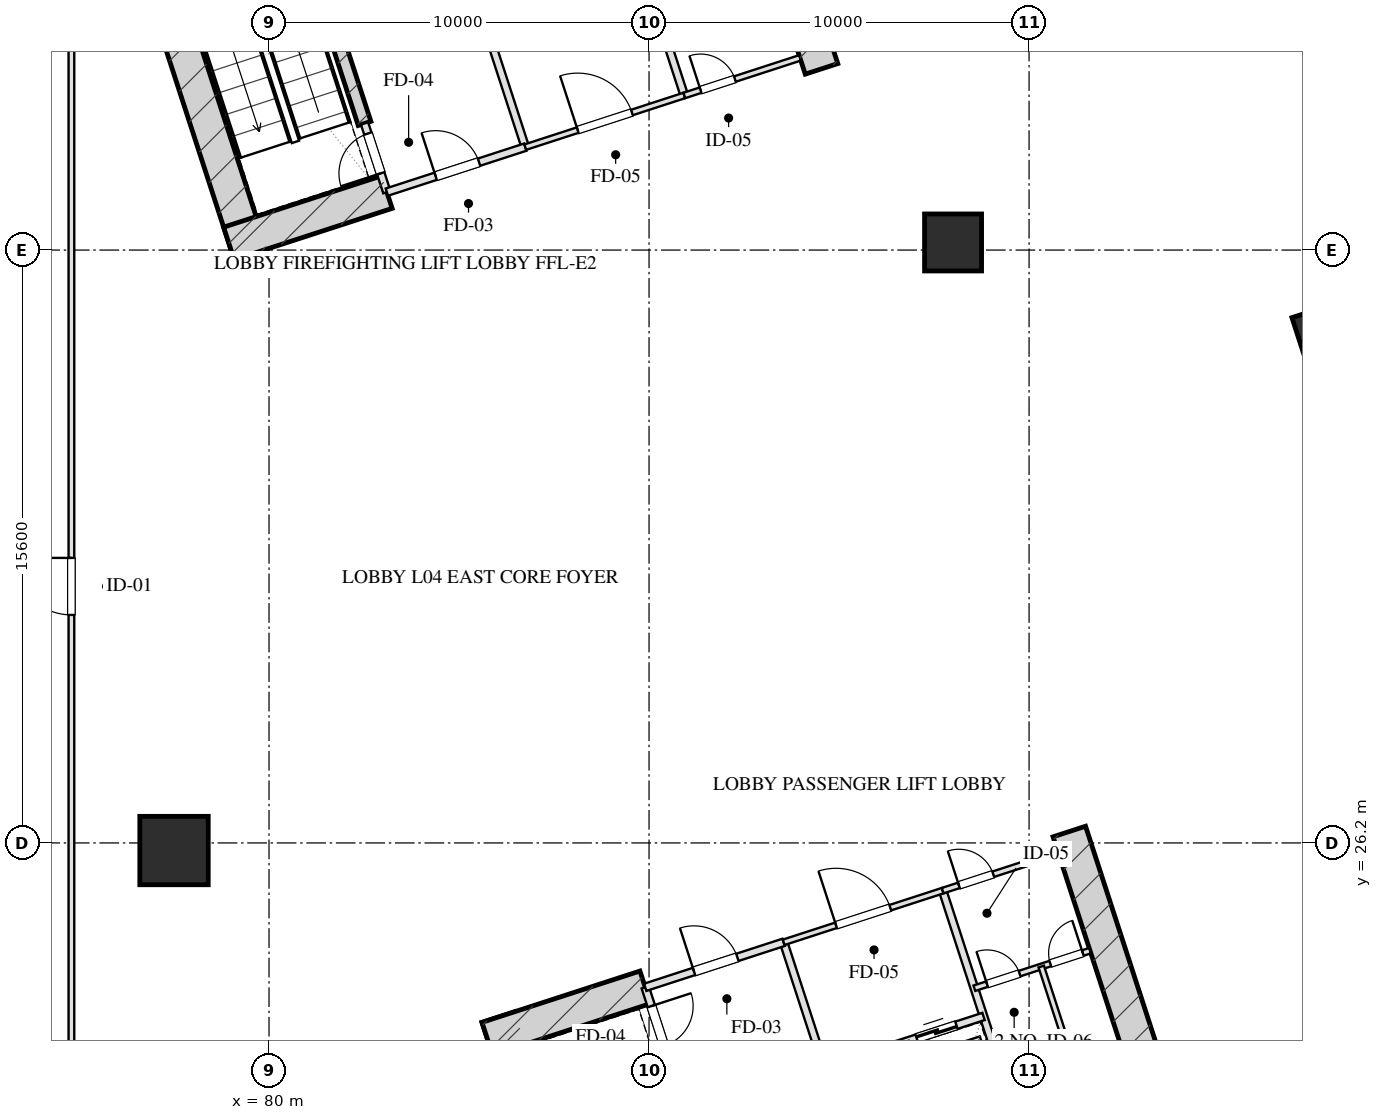
"""IFC4 building model, lengths in metres.
Left out: names, types, materials, properties, quantities, classifications, styles, units other than length and angle.
Written with IfcOpenShell. Run it as: python <this file> out.ifc"""

import sys

from ifc_helpers import new_model, si_unit, direction, frame, frame_2d, origin, origin_2d, place, context, subcontext, project, spatial, rectangle, hollow_rectangle, extrude, element, fill, save


model = new_model("IFC4")
c1 = context("Model", 3, precision=1e-05, world=origin(), true_north=direction((0.0, 1.0)))
c2 = subcontext(c1, "Body", "Model", "MODEL_VIEW")
j1 = project(units=[si_unit("LENGTHUNIT", "METRE"), si_unit("PLANEANGLEUNIT", "RADIAN")], contexts=[c1])
p1 = place(None, origin())
s1 = spatial("IfcSite", under=j1, at=p1, CompositionType="ELEMENT")
p2 = place(p1, origin())
s2 = spatial("IfcBuilding", under=s1, at=p2, CompositionType="ELEMENT")
p3 = place(p2, frame((0.0, 0.0, 22.0)))
s3 = spatial("IfcBuildingStorey", under=s2, at=p3, CompositionType="ELEMENT", Elevation=22.0)
p4 = place(p3, frame((86.032, 21.618, 0.0), z_axis=(0.0, 0.0, 1.0), x_axis=(0.30901438634, -0.951057363693, 0.0)))
e1 = element("IfcWall", 1, at=p4, inside=s3, PredefinedType="SHEAR", context=c2, shape_type="SweptSolid", body=[
    extrude(rectangle(XDim=9.78, YDim=0.9, at=frame_2d((4.89, 0.0))), origin(), (0.0, 0.0, 1.0), 4.0),
])
p5 = place(p3, frame((101.059, 26.5, 0.0), z_axis=(0.0, 0.0, 1.0), x_axis=(0.309021722829, -0.951054979914, 0.0)))
e2 = element("IfcWall", 2, at=p5, inside=s3, PredefinedType="SHEAR", context=c2, shape_type="SweptSolid", body=[
    extrude(rectangle(XDim=9.78, YDim=0.9, at=frame_2d((4.89, 0.0))), origin(), (0.0, 0.0, 1.0), 4.0),
])
p6 = place(p3, frame((85.743, 21.051, 0.0), z_axis=(0.0, 0.0, 1.0), x_axis=(0.951063623806, 0.308995118848, 0.0)))
e3 = element("IfcWall", 3, at=p6, inside=s3, PredefinedType="SHEAR", context=c2, shape_type="SweptSolid", body=[
    extrude(rectangle(XDim=4.37, YDim=0.9, at=frame_2d((2.185, 0.0))), origin(), (0.0, 0.0, 1.0), 4.0),
])
for number, where, z_axis, x_axis in (
    (4, (79.512, 41.685, 0.0), (0.0, 0.0, 1.0), (-0.309, 0.951, 0.0)),
    (5, (94.539, 46.568, 0.0), (0.0, 0.0, 1.0), (-0.309, 0.951, 0.0)),
):
    element("IfcWall", number, at=place(p3, frame(where, z_axis=z_axis, x_axis=x_axis)), inside=s3, PredefinedType="SHEAR", context=c2, shape_type="SweptSolid", body=[
        extrude(rectangle(XDim=9.78, YDim=0.9, at=frame_2d((4.89, 0.0))), origin(), (0.0, 0.0, 1.0), 4.0),
    ])
p7 = place(p3, frame((82.514, 45.131, 0.0), z_axis=(0.0, 0.0, 1.0), x_axis=(-0.308988790936, 0.951065679686, 0.0)))
e6 = element("IfcWall", 6, at=p7, inside=s3, PredefinedType="SHEAR", context=c2, shape_type="SweptSolid", body=[
    extrude(rectangle(XDim=6.98, YDim=0.35, at=frame_2d((3.49, 0.0))), origin(), (0.0, 0.0, 1.0), 4.0),
])
p8 = place(p3, frame((78.945, 41.974, 0.0), z_axis=(0.0, 0.0, 1.0), x_axis=(0.951058289404, 0.309011537255, 0.0)))
e7 = element("IfcWall", 7, at=p8, inside=s3, PredefinedType="SHEAR", context=c2, shape_type="SweptSolid", body=[
    extrude(rectangle(XDim=4.37, YDim=0.9, at=frame_2d((2.185, 0.0))), origin(), (0.0, 0.0, 1.0), 4.0),
])
p9 = place(p3, frame((77.5, 26.0, 0.0), z_axis=(0.0, 0.0, 1.0), x_axis=(1.0, 0.0, 0.0)))
e8 = element("IfcColumn", 8, at=p9, inside=s3, PredefinedType="COLUMN", context=c2, shape_type="SweptSolid", body=[
    extrude(hollow_rectangle(XDim=1.8, YDim=1.8, WallThickness=0.06, at=origin_2d()), origin(), (0.0, 0.0, 1.0), 4.001),
])
p10 = place(p3, frame((98.0, 42.0, 0.0), z_axis=(0.0, 0.0, 1.0), x_axis=(1.0, 0.0, 0.0)))
e9 = element("IfcColumn", 9, at=p10, inside=s3, PredefinedType="COLUMN", context=c2, shape_type="SweptSolid", body=[
    extrude(rectangle(XDim=1.5, YDim=1.5, at=origin_2d()), origin(), (0.0, 0.0, 1.0), 4.001),
])
p11 = place(p3, frame((107.547, 39.701, 0.0), z_axis=(0.0, 0.0, 1.0), x_axis=(0.951056516295, 0.309016994375, 0.0)))
e10 = element("IfcColumn", 10, at=p11, inside=s3, PredefinedType="COLUMN", context=c2, shape_type="SweptSolid", body=[
    extrude(hollow_rectangle(XDim=1.0, YDim=1.0, WallThickness=0.036, at=origin_2d()), origin(), (0.0, 0.0, 1.0), 4.001),
])
p12 = place(p3, frame((89.899, 22.401, 0.0), z_axis=(0.0, 0.0, 1.0), x_axis=(0.308932062672, -0.951084108086, 0.0)))
e11 = element("IfcWall", 11, at=p12, inside=s3, PredefinedType="PARTITIONING", context=c2, shape_type="SweptSolid", body=[
    extrude(rectangle(XDim=1.9, YDim=0.2, at=frame_2d((0.95, 0.0))), origin(), (0.0, 0.0, 1.0), 3.725),
])
p13 = place(p12, frame((0.52, 0.0, 0.0)))
e12 = element("IfcOpeningElement", 12, at=p13, cuts=e11, PredefinedType="OPENING", context=c2, shape_type="SweptSolid", body=[
    extrude(rectangle(XDim=1.1, YDim=2.05, at=frame_2d((0.55, 1.025))), frame((0.0, 0.11, 0.0), z_axis=(0.0, -1.0, 0.0), x_axis=(1.0, 0.0, 0.0)), (0.0, 0.0, 1.0), 0.22),
])
p14 = place(p3, frame((93.542, 23.585, 0.0), z_axis=(0.0, 0.0, 1.0), x_axis=(0.309042196757, -0.951048327176, 0.0)))
e13 = element("IfcWall", 13, at=p14, inside=s3, PredefinedType="PARTITIONING", context=c2, shape_type="SweptSolid", body=[
    extrude(rectangle(XDim=8.43, YDim=0.2, at=frame_2d((4.215, 0.0))), origin(), (0.0, 0.0, 1.0), 3.725),
])
p15 = place(p3, frame((89.899, 22.401, 0.0), z_axis=(0.0, 0.0, 1.0), x_axis=(0.951046716504, 0.309047153403, 0.0)))
e14 = element("IfcWall", 14, at=p15, inside=s3, PredefinedType="PARTITIONING", context=c2, shape_type="SweptSolid", body=[
    extrude(rectangle(XDim=3.83, YDim=0.2, at=frame_2d((1.915, 0.0))), origin(), (0.0, 0.0, 1.0), 3.725),
])
p16 = place(p15, frame((1.35, 0.0, 0.0)))
e15 = element("IfcOpeningElement", 15, at=p16, cuts=e14, PredefinedType="OPENING", context=c2, shape_type="SweptSolid", body=[
    extrude(rectangle(XDim=1.2, YDim=2.05, at=frame_2d((0.6, 1.025))), frame((0.0, 0.11, 0.0), z_axis=(0.0, -1.0, 0.0), x_axis=(1.0, 0.0, 0.0)), (0.0, 0.0, 1.0), 0.22),
])
p17 = place(p3, frame((97.727, 24.944, 0.0), z_axis=(0.0, 0.0, 1.0), x_axis=(0.309016001439, -0.951056838919, 0.0)))
e16 = element("IfcWall", 16, at=p17, inside=s3, PredefinedType="PARTITIONING", context=c2, shape_type="SweptSolid", body=[
    extrude(rectangle(XDim=8.43, YDim=0.2, at=frame_2d((4.215, 0.0))), origin(), (0.0, 0.0, 1.0), 3.725),
])
p18 = place(p3, frame((93.542, 23.585, 0.0), z_axis=(0.0, 0.0, 1.0), x_axis=(0.951063829732, 0.308994485023, 0.0)))
e17 = element("IfcWall", 17, at=p18, inside=s3, PredefinedType="PARTITIONING", context=c2, shape_type="SweptSolid", body=[
    extrude(rectangle(XDim=4.4, YDim=0.15, at=frame_2d((2.2, 0.0))), origin(), (0.0, 0.0, 1.0), 3.725),
])
p19 = place(p18, frame((1.45, 0.0, 0.0)))
e18 = element("IfcOpeningElement", 18, at=p19, cuts=e17, PredefinedType="OPENING", context=c2, shape_type="SweptSolid", body=[
    extrude(rectangle(XDim=1.5, YDim=2.05, at=frame_2d((0.75, 1.025))), frame((0.0, 0.085, 0.0), z_axis=(0.0, -1.0, 0.0), x_axis=(1.0, 0.0, 0.0)), (0.0, 0.0, 1.0), 0.17),
])
p20 = place(p3, frame((94.617, 20.275, 0.0), z_axis=(0.0, 0.0, 1.0), x_axis=(0.951058531764, 0.30901079133, 0.0)))
e19 = element("IfcWall", 19, at=p20, inside=s3, PredefinedType="PARTITIONING", context=c2, shape_type="SweptSolid", body=[
    extrude(rectangle(XDim=4.4, YDim=0.2, at=frame_2d((2.2, 0.0))), origin(), (0.0, 0.0, 1.0), 3.725),
])
p21 = place(p20, frame((0.45, 0.0, 0.0)))
e20 = element("IfcOpeningElement", 20, at=p21, cuts=e19, PredefinedType="OPENING", context=c2, shape_type="SweptSolid", body=[
    extrude(rectangle(XDim=1.1, YDim=2.05, at=frame_2d((0.55, 1.025))), frame((0.0, 0.11, 0.0), z_axis=(0.0, -1.0, 0.0), x_axis=(1.0, 0.0, 0.0)), (0.0, 0.0, 1.0), 0.22),
])
p22 = place(p20, frame((2.55, 0.0, 0.0)))
e21 = element("IfcOpeningElement", 21, at=p22, cuts=e19, PredefinedType="OPENING", context=c2, shape_type="SweptSolid", body=[
    extrude(rectangle(XDim=1.1, YDim=2.05, at=frame_2d((0.55, 1.025))), frame((0.0, 0.11, 0.0), z_axis=(0.0, -1.0, 0.0), x_axis=(1.0, 0.0, 0.0)), (0.0, 0.0, 1.0), 0.22),
])
p23 = place(p3, frame((97.727, 24.944, 0.0), z_axis=(0.0, 0.0, 1.0), x_axis=(0.951036872128, 0.309077446369, 0.0)))
e22 = element("IfcWall", 22, at=p23, inside=s3, PredefinedType="PARTITIONING", context=c2, shape_type="SweptSolid", body=[
    extrude(rectangle(XDim=3.2, YDim=0.15, at=frame_2d((1.6, 0.0))), origin(), (0.0, 0.0, 1.0), 3.725),
])
p24 = place(p23, frame((0.45, 0.0, 0.0)))
e23 = element("IfcOpeningElement", 23, at=p24, cuts=e22, PredefinedType="OPENING", context=c2, shape_type="SweptSolid", body=[
    extrude(rectangle(XDim=0.95, YDim=2.05, at=frame_2d((0.475, 1.025))), frame((0.0, 0.085, 0.0), z_axis=(0.0, -1.0, 0.0), x_axis=(1.0, 0.0, 0.0)), (0.0, 0.0, 1.0), 0.17),
])
p25 = place(p3, frame((98.561, 22.376, 0.0), z_axis=(0.0, 0.0, 1.0), x_axis=(0.95104415986, 0.309055020985, 0.0)))
e24 = element("IfcWall", 24, at=p25, inside=s3, PredefinedType="PARTITIONING", context=c2, shape_type="SweptSolid", body=[
    extrude(rectangle(XDim=3.2, YDim=0.15, at=frame_2d((1.6, 0.0))), origin(), (0.0, 0.0, 1.0), 3.725),
])
p26 = place(p25, frame((0.35, 0.0, 0.0)))
e25 = element("IfcOpeningElement", 25, at=p26, cuts=e24, PredefinedType="OPENING", context=c2, shape_type="SweptSolid", body=[
    extrude(rectangle(XDim=0.9, YDim=2.05, at=frame_2d((0.45, 1.025))), frame((0.0, 0.085, 0.0), z_axis=(0.0, -1.0, 0.0), x_axis=(1.0, 0.0, 0.0)), (0.0, 0.0, 1.0), 0.17),
])
p27 = place(p25, frame((2.1, 0.0, 0.0)))
e26 = element("IfcOpeningElement", 26, at=p27, cuts=e24, PredefinedType="OPENING", context=c2, shape_type="SweptSolid", body=[
    extrude(rectangle(XDim=0.9, YDim=2.05, at=frame_2d((0.45, 1.025))), frame((0.0, 0.085, 0.0), z_axis=(0.0, -1.0, 0.0), x_axis=(1.0, 0.0, 0.0)), (0.0, 0.0, 1.0), 0.17),
])
p28 = place(p3, frame((100.32, 22.948, 0.0), z_axis=(0.0, 0.0, 1.0), x_axis=(0.309035009867, -0.951050662518, 0.0)))
e27 = element("IfcWall", 27, at=p28, inside=s3, PredefinedType="PARTITIONING", context=c2, shape_type="SweptSolid", body=[
    extrude(rectangle(XDim=5.73, YDim=0.15, at=frame_2d((2.865, 0.0))), origin(), (0.0, 0.0, 1.0), 3.725),
])
p29 = place(p3, frame((83.101, 43.324, 0.0), z_axis=(0.0, 0.0, 1.0), x_axis=(-0.309048298632, 0.951046344356, 0.0)))
e28 = element("IfcWall", 28, at=p29, inside=s3, PredefinedType="PARTITIONING", context=c2, shape_type="SweptSolid", body=[
    extrude(rectangle(XDim=1.9, YDim=0.2, at=frame_2d((0.95, 0.0))), origin(), (0.0, 0.0, 1.0), 3.725),
])
p30 = place(p29, frame((0.52, 0.0, 0.0)))
e29 = element("IfcOpeningElement", 29, at=p30, cuts=e28, PredefinedType="OPENING", context=c2, shape_type="SweptSolid", body=[
    extrude(rectangle(XDim=1.1, YDim=2.05, at=frame_2d((0.55, 1.025))), frame((0.0, 0.11, 0.0), z_axis=(0.0, -1.0, 0.0), x_axis=(1.0, 0.0, 0.0)), (0.0, 0.0, 1.0), 0.22),
])
p31 = place(p3, frame((86.743, 44.508, 0.0), z_axis=(0.0, 0.0, 1.0), x_axis=(-0.309016001439, 0.951056838919, 0.0)))
e30 = element("IfcWall", 30, at=p31, inside=s3, PredefinedType="PARTITIONING", context=c2, shape_type="SweptSolid", body=[
    extrude(rectangle(XDim=8.43, YDim=0.2, at=frame_2d((4.215, 0.0))), origin(), (0.0, 0.0, 1.0), 3.725),
])
p32 = place(p3, frame((83.101, 43.324, 0.0), z_axis=(0.0, 0.0, 1.0), x_axis=(0.951052804469, 0.309028417967, 0.0)))
e31 = element("IfcWall", 31, at=p32, inside=s3, PredefinedType="PARTITIONING", context=c2, shape_type="SweptSolid", body=[
    extrude(rectangle(XDim=3.83, YDim=0.2, at=frame_2d((1.915, 0.0))), origin(), (0.0, 0.0, 1.0), 3.725),
])
p33 = place(p32, frame((1.35, 0.0, 0.0)))
e32 = element("IfcOpeningElement", 32, at=p33, cuts=e31, PredefinedType="OPENING", context=c2, shape_type="SweptSolid", body=[
    extrude(rectangle(XDim=1.2, YDim=2.05, at=frame_2d((0.6, 1.025))), frame((0.0, 0.11, 0.0), z_axis=(0.0, -1.0, 0.0), x_axis=(1.0, 0.0, 0.0)), (0.0, 0.0, 1.0), 0.22),
])
p34 = place(p3, frame((90.928, 45.868, 0.0), z_axis=(0.0, 0.0, 1.0), x_axis=(-0.309042196757, 0.951048327176, 0.0)))
e33 = element("IfcWall", 33, at=p34, inside=s3, PredefinedType="PARTITIONING", context=c2, shape_type="SweptSolid", body=[
    extrude(rectangle(XDim=8.43, YDim=0.2, at=frame_2d((4.215, 0.0))), origin(), (0.0, 0.0, 1.0), 3.725),
])
p35 = place(p3, frame((86.743, 44.508, 0.0), z_axis=(0.0, 0.0, 1.0), x_axis=(0.951063829732, 0.308994485023, 0.0)))
e34 = element("IfcWall", 34, at=p35, inside=s3, PredefinedType="PARTITIONING", context=c2, shape_type="SweptSolid", body=[
    extrude(rectangle(XDim=4.4, YDim=0.15, at=frame_2d((2.2, 0.0))), origin(), (0.0, 0.0, 1.0), 3.725),
])
p36 = place(p35, frame((1.45, 0.0, 0.0)))
e35 = element("IfcOpeningElement", 35, at=p36, cuts=e34, PredefinedType="OPENING", context=c2, shape_type="SweptSolid", body=[
    extrude(rectangle(XDim=1.5, YDim=2.05, at=frame_2d((0.75, 1.025))), frame((0.0, 0.085, 0.0), z_axis=(0.0, -1.0, 0.0), x_axis=(1.0, 0.0, 0.0)), (0.0, 0.0, 1.0), 0.17),
])
p37 = place(p3, frame((90.928, 45.868, 0.0), z_axis=(0.0, 0.0, 1.0), x_axis=(0.951059297078, 0.309008435874, 0.0)))
e36 = element("IfcWall", 36, at=p37, inside=s3, PredefinedType="PARTITIONING", context=c2, shape_type="SweptSolid", body=[
    extrude(rectangle(XDim=3.2, YDim=0.15, at=frame_2d((1.6, 0.0))), origin(), (0.0, 0.0, 1.0), 3.725),
])
p38 = place(p37, frame((0.45, 0.0, 0.0)))
e37 = element("IfcOpeningElement", 37, at=p38, cuts=e36, PredefinedType="OPENING", context=c2, shape_type="SweptSolid", body=[
    extrude(rectangle(XDim=0.95, YDim=2.05, at=frame_2d((0.475, 1.025))), frame((0.0, 0.085, 0.0), z_axis=(0.0, -1.0, 0.0), x_axis=(1.0, 0.0, 0.0)), (0.0, 0.0, 1.0), 0.17),
])
p39 = place(p3, frame((74.8, 18.2, 0.0), z_axis=(0.0, 0.0, 1.0), x_axis=(0.0, 1.0, 0.0)))
e38 = element("IfcWall", 38, at=p39, inside=s3, PredefinedType="PARTITIONING", context=c2, shape_type="SweptSolid", body=[
    extrude(rectangle(XDim=31.6, YDim=0.15, at=frame_2d((15.8, 0.0))), origin(), (0.0, 0.0, 1.0), 2.315),
])
p40 = place(p39, frame((14.0, 0.0, 0.0)))
e39 = element("IfcOpeningElement", 39, at=p40, cuts=e38, PredefinedType="OPENING", context=c2, shape_type="SweptSolid", body=[
    extrude(rectangle(XDim=1.5, YDim=2.05, at=frame_2d((0.75, 1.025))), frame((0.0, 0.085, 0.0), z_axis=(0.0, -1.0, 0.0), x_axis=(1.0, 0.0, 0.0)), (0.0, 0.0, 1.0), 0.17),
])
p41 = place(p13, origin())
e40 = element("IfcDoor", 40, at=p41, inside=s3, OperationType="SINGLE_SWING_LEFT", PredefinedType="DOOR", context=c2, shape_type="SweptSolid", body=[
    extrude(rectangle(XDim=1.1, YDim=2.05, at=frame_2d((0.55, 1.025))), frame((0.0, 0.025, 0.0), z_axis=(0.0, -1.0, 0.0), x_axis=(1.0, 0.0, 0.0)), (0.0, 0.0, 1.0), 0.05),
])
fill(e12, e40)
p42 = place(p16, origin())
e41 = element("IfcDoor", 41, at=p42, inside=s3, OperationType="SINGLE_SWING_LEFT", PredefinedType="DOOR", context=c2, shape_type="SweptSolid", body=[
    extrude(rectangle(XDim=1.2, YDim=2.05, at=frame_2d((0.6, 1.025))), frame((0.0, 0.025, 0.0), z_axis=(0.0, -1.0, 0.0), x_axis=(1.0, 0.0, 0.0)), (0.0, 0.0, 1.0), 0.05),
])
fill(e15, e41)
p43 = place(p19, origin())
e42 = element("IfcDoor", 42, at=p43, inside=s3, OperationType="SINGLE_SWING_LEFT", PredefinedType="DOOR", context=c2, shape_type="SweptSolid", body=[
    extrude(rectangle(XDim=1.5, YDim=2.05, at=frame_2d((0.75, 1.025))), frame((0.0, 0.025, 0.0), z_axis=(0.0, -1.0, 0.0), x_axis=(1.0, 0.0, 0.0)), (0.0, 0.0, 1.0), 0.05),
])
fill(e18, e42)
p44 = place(p22, origin())
e43 = element("IfcDoor", 43, at=p44, inside=s3, OperationType="DOUBLE_DOOR_SLIDING", PredefinedType="DOOR", context=c2, shape_type="SweptSolid", body=[
    extrude(rectangle(XDim=1.1, YDim=2.05, at=frame_2d((0.55, 1.025))), frame((0.0, 0.025, 0.0), z_axis=(0.0, -1.0, 0.0), x_axis=(1.0, 0.0, 0.0)), (0.0, 0.0, 1.0), 0.05),
])
fill(e21, e43)
p45 = place(p24, origin())
e44 = element("IfcDoor", 44, at=p45, inside=s3, OperationType="SINGLE_SWING_LEFT", PredefinedType="DOOR", context=c2, shape_type="SweptSolid", body=[
    extrude(rectangle(XDim=0.95, YDim=2.05, at=frame_2d((0.475, 1.025))), frame((0.0, 0.025, 0.0), z_axis=(0.0, -1.0, 0.0), x_axis=(1.0, 0.0, 0.0)), (0.0, 0.0, 1.0), 0.05),
])
fill(e23, e44)
p46 = place(p26, origin())
e45 = element("IfcDoor", 45, at=p46, inside=s3, OperationType="SINGLE_SWING_LEFT", PredefinedType="DOOR", context=c2, shape_type="SweptSolid", body=[
    extrude(rectangle(XDim=0.9, YDim=2.05, at=frame_2d((0.45, 1.025))), frame((0.0, 0.025, 0.0), z_axis=(0.0, -1.0, 0.0), x_axis=(1.0, 0.0, 0.0)), (0.0, 0.0, 1.0), 0.05),
])
fill(e25, e45)
p47 = place(p27, origin())
e46 = element("IfcDoor", 46, at=p47, inside=s3, OperationType="SINGLE_SWING_RIGHT", PredefinedType="DOOR", context=c2, shape_type="SweptSolid", body=[
    extrude(rectangle(XDim=0.9, YDim=2.05, at=frame_2d((0.45, 1.025))), frame((0.0, 0.025, 0.0), z_axis=(0.0, -1.0, 0.0), x_axis=(1.0, 0.0, 0.0)), (0.0, 0.0, 1.0), 0.05),
])
fill(e26, e46)
p48 = place(p30, origin())
e47 = element("IfcDoor", 47, at=p48, inside=s3, OperationType="SINGLE_SWING_LEFT", PredefinedType="DOOR", context=c2, shape_type="SweptSolid", body=[
    extrude(rectangle(XDim=1.1, YDim=2.05, at=frame_2d((0.55, 1.025))), frame((0.0, 0.025, 0.0), z_axis=(0.0, -1.0, 0.0), x_axis=(1.0, 0.0, 0.0)), (0.0, 0.0, 1.0), 0.05),
])
fill(e29, e47)
p49 = place(p33, origin())
e48 = element("IfcDoor", 48, at=p49, inside=s3, OperationType="SINGLE_SWING_LEFT", PredefinedType="DOOR", context=c2, shape_type="SweptSolid", body=[
    extrude(rectangle(XDim=1.2, YDim=2.05, at=frame_2d((0.6, 1.025))), frame((0.0, 0.025, 0.0), z_axis=(0.0, -1.0, 0.0), x_axis=(1.0, 0.0, 0.0)), (0.0, 0.0, 1.0), 0.05),
])
fill(e32, e48)
p50 = place(p36, origin())
e49 = element("IfcDoor", 49, at=p50, inside=s3, OperationType="SINGLE_SWING_LEFT", PredefinedType="DOOR", context=c2, shape_type="SweptSolid", body=[
    extrude(rectangle(XDim=1.5, YDim=2.05, at=frame_2d((0.75, 1.025))), frame((0.0, 0.025, 0.0), z_axis=(0.0, -1.0, 0.0), x_axis=(1.0, 0.0, 0.0)), (0.0, 0.0, 1.0), 0.05),
])
fill(e35, e49)
p51 = place(p38, origin())
e50 = element("IfcDoor", 50, at=p51, inside=s3, OperationType="SINGLE_SWING_LEFT", PredefinedType="DOOR", context=c2, shape_type="SweptSolid", body=[
    extrude(rectangle(XDim=0.95, YDim=2.05, at=frame_2d((0.475, 1.025))), frame((0.0, 0.025, 0.0), z_axis=(0.0, -1.0, 0.0), x_axis=(1.0, 0.0, 0.0)), (0.0, 0.0, 1.0), 0.05),
])
fill(e37, e50)
p52 = place(p40, origin())
e51 = element("IfcDoor", 51, at=p52, inside=s3, OperationType="SINGLE_SWING_RIGHT", PredefinedType="DOOR", context=c2, shape_type="SweptSolid", body=[
    extrude(rectangle(XDim=1.5, YDim=2.05, at=frame_2d((0.75, 1.025))), frame((0.0, 0.025, 0.0), z_axis=(0.0, -1.0, 0.0), x_axis=(1.0, 0.0, 0.0)), (0.0, 0.0, 1.0), 0.05),
])
fill(e39, e51)
save(model, sys.argv[1])
